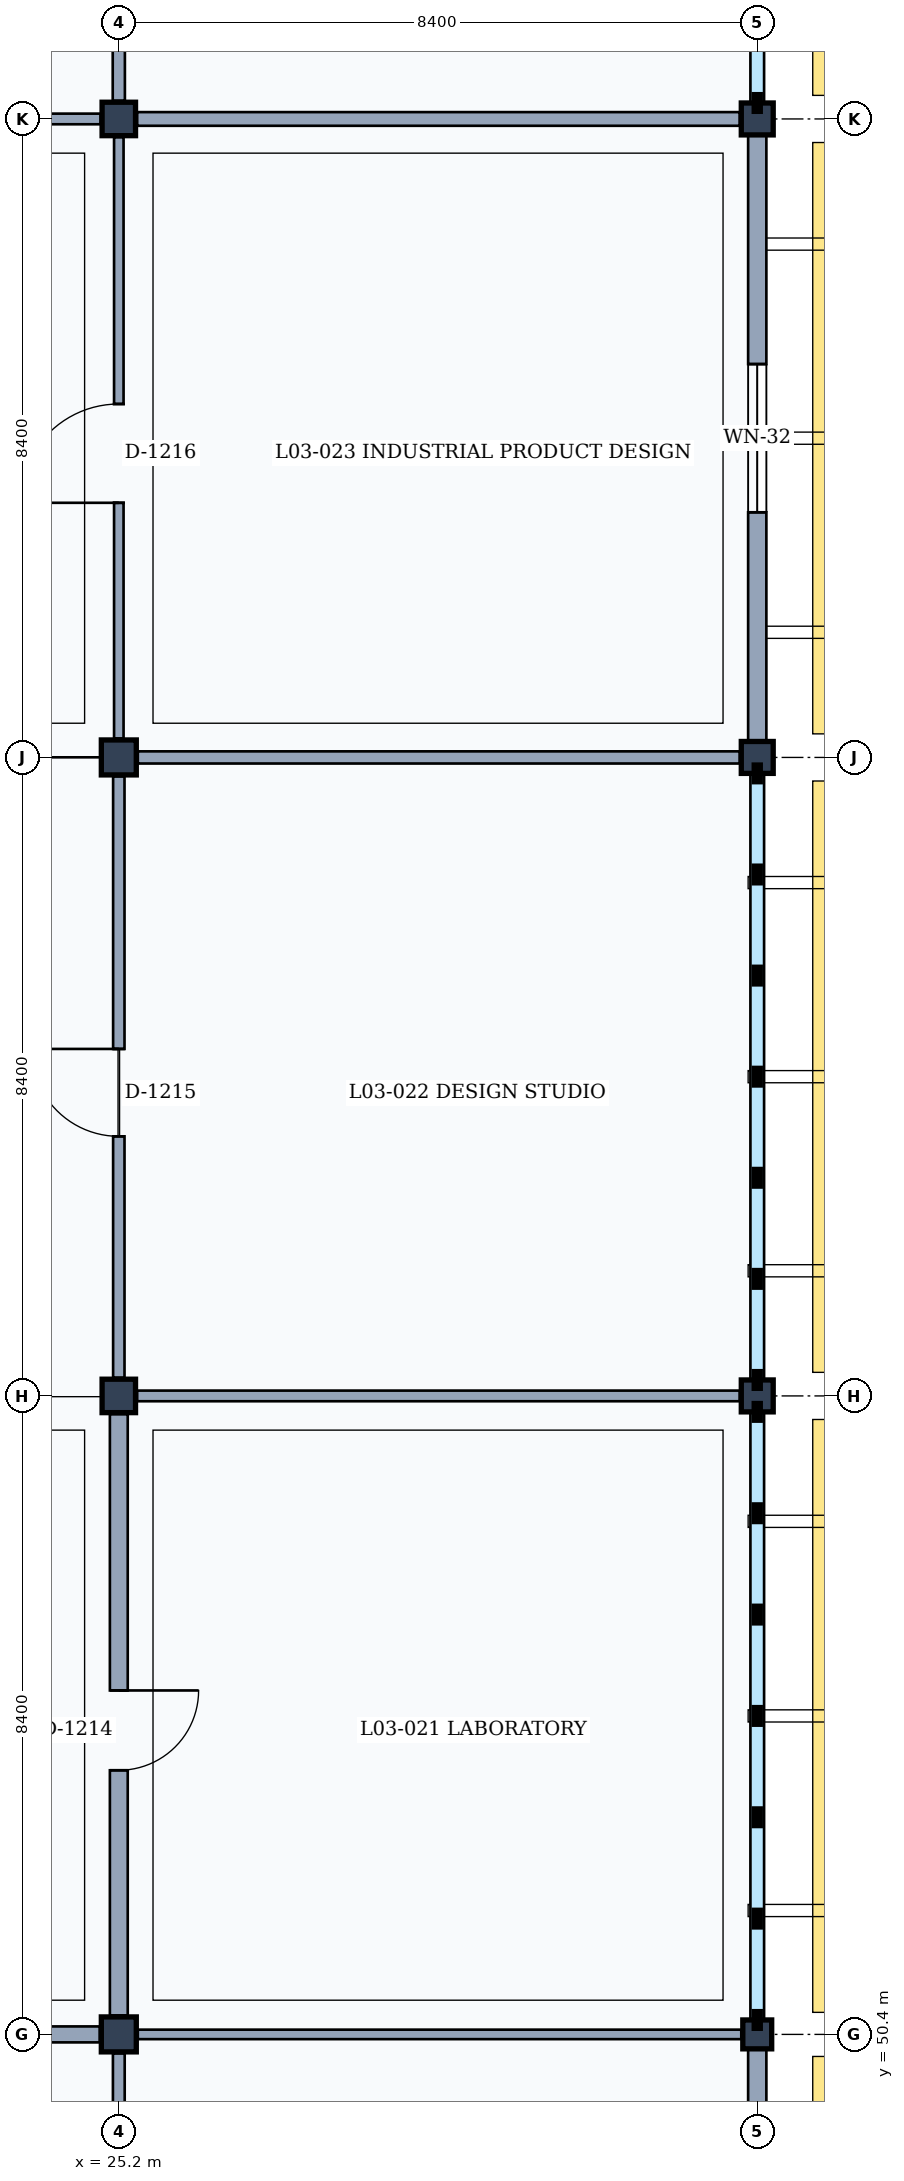
"""IFC4 building model, lengths in metres.
Left out: names, types, materials, properties, quantities, classifications, styles, units other than length and angle.
Written with IfcOpenShell. Run it as: python <this file> out.ifc"""

import sys

from ifc_helpers import new_model, si_unit, direction, frame, frame_2d, origin, origin_2d, place, context, subcontext, project, spatial, rectangle, extrude, element, fill, save


model = new_model("IFC4")
c1 = context("Model", 3, precision=1e-05, world=origin(), true_north=direction((0.0, 1.0)))
c2 = subcontext(c1, "Body", "Model", "MODEL_VIEW")
j1 = project(units=[si_unit("LENGTHUNIT", "METRE"), si_unit("PLANEANGLEUNIT", "RADIAN")], contexts=[c1])
p1 = place(None, origin())
s1 = spatial("IfcSite", under=j1, at=p1, CompositionType="ELEMENT")
p2 = place(p1, origin())
s2 = spatial("IfcBuilding", under=s1, at=p2, CompositionType="ELEMENT")
p3 = place(p2, frame((0.0, 0.0, 13.8)))
s3 = spatial("IfcBuildingStorey", under=s2, at=p3, CompositionType="ELEMENT", Elevation=13.8)
p4 = place(p3, frame((25.2, 50.4, 0.0), z_axis=(0.0, 0.0, 1.0), x_axis=(1.0, 0.0, 0.0)))
e1 = element("IfcColumn", 1, at=p4, inside=s3, PredefinedType="COLUMN", context=c2, shape_type="SweptSolid", body=[
    extrude(rectangle(XDim=0.46, YDim=0.46, at=origin_2d()), origin(), (0.0, 0.0, 1.0), 4.2),
])
p5 = place(p3, frame((25.2, 58.8, 0.0), z_axis=(0.0, 0.0, 1.0), x_axis=(1.0, 0.0, 0.0)))
e2 = element("IfcColumn", 2, at=p5, inside=s3, PredefinedType="COLUMN", context=c2, shape_type="SweptSolid", body=[
    extrude(rectangle(XDim=0.44, YDim=0.44, at=origin_2d()), origin(), (0.0, 0.0, 1.0), 4.2),
])
p6 = place(p3, frame((25.2, 67.2, 0.0), z_axis=(0.0, 0.0, 1.0), x_axis=(1.0, 0.0, 0.0)))
e3 = element("IfcColumn", 3, at=p6, inside=s3, PredefinedType="COLUMN", context=c2, shape_type="SweptSolid", body=[
    extrude(rectangle(XDim=0.46, YDim=0.46, at=origin_2d()), origin(), (0.0, 0.0, 1.0), 4.2),
])
p7 = place(p3, frame((25.2, 75.6, 0.0), z_axis=(0.0, 0.0, 1.0), x_axis=(1.0, 0.0, 0.0)))
e4 = element("IfcColumn", 4, at=p7, inside=s3, PredefinedType="COLUMN", context=c2, shape_type="SweptSolid", body=[
    extrude(rectangle(XDim=0.44, YDim=0.44, at=origin_2d()), origin(), (0.0, 0.0, 1.0), 4.2),
])
p8 = place(p3, frame((33.6, 50.4, 0.0), z_axis=(0.0, 0.0, 1.0), x_axis=(1.0, 0.0, 0.0)))
e5 = element("IfcColumn", 5, at=p8, inside=s3, PredefinedType="COLUMN", context=c2, shape_type="SweptSolid", body=[
    extrude(rectangle(XDim=0.38, YDim=0.38, at=origin_2d()), origin(), (0.0, 0.0, 1.0), 4.2),
])
for number, where, z_axis, x_axis in (
    (6, (33.6, 58.8, 0.0), (0.0, 0.0, 1.0), (1.0, 0.0, 0.0)),
    (7, (33.6, 67.2, 0.0), (0.0, 0.0, 1.0), (1.0, 0.0, 0.0)),
    (8, (33.6, 75.6, 0.0), (0.0, 0.0, 1.0), (1.0, 0.0, 0.0)),
):
    element("IfcColumn", number, at=place(p3, frame(where, z_axis=z_axis, x_axis=x_axis)), inside=s3, PredefinedType="COLUMN", context=c2, shape_type="SweptSolid", body=[
        extrude(rectangle(XDim=0.42, YDim=0.42, at=origin_2d()), origin(), (0.0, 0.0, 1.0), 4.2),
    ])
p9 = place(p3, frame((33.6, 50.21, 0.0), z_axis=(0.0, 0.0, 1.0), x_axis=(0.0, -1.0, 0.0)))
e9 = element("IfcWall", 9, at=p9, inside=s3, PredefinedType="SOLIDWALL", context=c2, shape_type="SweptSolid", body=[
    extrude(rectangle(XDim=8.04, YDim=0.24, at=frame_2d((4.02, 0.0))), origin(), (0.0, 0.0, 1.0), 3.36),
])
p10 = place(p9, frame((3.195, 0.0, 0.9)))
e10 = element("IfcOpeningElement", 10, at=p10, cuts=e9, PredefinedType="OPENING", context=c2, shape_type="SweptSolid", body=[
    extrude(rectangle(XDim=1.65, YDim=1.9, at=frame_2d((0.825, 0.95))), frame((0.0, 0.13, 0.0), z_axis=(0.0, -1.0, 0.0), x_axis=(1.0, 0.0, 0.0)), (0.0, 0.0, 1.0), 0.26),
])
p11 = place(p3, frame((33.6, 75.39, 0.0), z_axis=(0.0, 0.0, 1.0), x_axis=(0.0, -1.0, 0.0)))
e11 = element("IfcWall", 11, at=p11, inside=s3, PredefinedType="SOLIDWALL", context=c2, shape_type="SweptSolid", body=[
    extrude(rectangle(XDim=7.98, YDim=0.24, at=frame_2d((3.99, 0.0))), origin(), (0.0, 0.0, 1.0), 3.36),
])
p12 = place(p11, frame((3.015, 0.0, 0.9)))
e12 = element("IfcOpeningElement", 12, at=p12, cuts=e11, PredefinedType="OPENING", context=c2, shape_type="SweptSolid", body=[
    extrude(rectangle(XDim=1.95, YDim=1.7, at=frame_2d((0.975, 0.85))), frame((0.0, 0.13, 0.0), z_axis=(0.0, -1.0, 0.0), x_axis=(1.0, 0.0, 0.0)), (0.0, 0.0, 1.0), 0.26),
])
p13 = place(p3, frame((25.2, 42.19, 0.0), z_axis=(0.0, 0.0, 1.0), x_axis=(0.0, 1.0, 0.0)))
e13 = element("IfcWall", 13, at=p13, inside=s3, PredefinedType="PARTITIONING", context=c2, shape_type="SweptSolid", body=[
    extrude(rectangle(XDim=7.96, YDim=0.155, at=frame_2d((3.98, 0.0))), origin(), (0.0, 0.0, 1.0), 3.32),
])
p14 = place(p13, frame((2.925, 0.0, 0.0)))
e14 = element("IfcOpeningElement", 14, at=p14, cuts=e13, PredefinedType="OPENING", context=c2, shape_type="SweptSolid", body=[
    extrude(rectangle(XDim=1.65, YDim=2.25, at=frame_2d((0.825, 1.125))), frame((0.0, 0.087, 0.0), z_axis=(0.0, -1.0, 0.0), x_axis=(1.0, 0.0, 0.0)), (0.0, 0.0, 1.0), 0.175),
])
p15 = place(p3, frame((17.05, 50.4, 0.0), z_axis=(0.0, 0.0, 1.0), x_axis=(1.0, 0.0, 0.0)))
e15 = element("IfcWall", 15, at=p15, inside=s3, PredefinedType="PARTITIONING", context=c2, shape_type="SweptSolid", body=[
    extrude(rectangle(XDim=7.9, YDim=0.21, at=frame_2d((3.95, 0.0))), origin(), (0.0, 0.0, 1.0), 3.32),
])
p16 = place(p3, frame((25.2, 50.65, 0.0), z_axis=(0.0, 0.0, 1.0), x_axis=(0.0, 1.0, 0.0)))
e16 = element("IfcWall", 16, at=p16, inside=s3, PredefinedType="PARTITIONING", context=c2, shape_type="SweptSolid", body=[
    extrude(rectangle(XDim=7.91, YDim=0.235, at=frame_2d((3.955, 0.0))), origin(), (0.0, 0.0, 1.0), 3.32),
])
p17 = place(p16, frame((3.225, 0.0, 0.0)))
e17 = element("IfcOpeningElement", 17, at=p17, cuts=e16, PredefinedType="OPENING", context=c2, shape_type="SweptSolid", body=[
    extrude(rectangle(XDim=1.05, YDim=2.2, at=frame_2d((0.525, 1.1))), frame((0.0, 0.127, 0.0), z_axis=(0.0, -1.0, 0.0), x_axis=(1.0, 0.0, 0.0)), (0.0, 0.0, 1.0), 0.255),
])
p18 = place(p3, frame((25.2, 59.04, 0.0), z_axis=(0.0, 0.0, 1.0), x_axis=(0.0, 1.0, 0.0)))
e18 = element("IfcWall", 18, at=p18, inside=s3, PredefinedType="PARTITIONING", context=c2, shape_type="SweptSolid", body=[
    extrude(rectangle(XDim=7.91, YDim=0.15, at=frame_2d((3.955, 0.0))), origin(), (0.0, 0.0, 1.0), 3.32),
])
p19 = place(p18, frame((3.175, 0.0, 0.0)))
e19 = element("IfcOpeningElement", 19, at=p19, cuts=e18, PredefinedType="OPENING", context=c2, shape_type="SweptSolid", body=[
    extrude(rectangle(XDim=1.15, YDim=2.25, at=frame_2d((0.575, 1.125))), frame((0.0, 0.085, 0.0), z_axis=(0.0, -1.0, 0.0), x_axis=(1.0, 0.0, 0.0)), (0.0, 0.0, 1.0), 0.17),
])
p20 = place(p3, frame((25.2, 67.45, 0.0), z_axis=(0.0, 0.0, 1.0), x_axis=(0.0, 1.0, 0.0)))
e20 = element("IfcWall", 20, at=p20, inside=s3, PredefinedType="PARTITIONING", context=c2, shape_type="SweptSolid", body=[
    extrude(rectangle(XDim=7.91, YDim=0.125, at=frame_2d((3.955, 0.0))), origin(), (0.0, 0.0, 1.0), 3.32),
])
p21 = place(p20, frame((3.1, 0.0, 0.0)))
e21 = element("IfcOpeningElement", 21, at=p21, cuts=e20, PredefinedType="OPENING", context=c2, shape_type="SweptSolid", body=[
    extrude(rectangle(XDim=1.3, YDim=2.2, at=frame_2d((0.65, 1.1))), frame((0.0, 0.073, 0.0), z_axis=(0.0, -1.0, 0.0), x_axis=(1.0, 0.0, 0.0)), (0.0, 0.0, 1.0), 0.145),
])
p22 = place(p3, frame((17.04, 75.6, 0.0), z_axis=(0.0, 0.0, 1.0), x_axis=(1.0, 0.0, 0.0)))
e22 = element("IfcWall", 22, at=p22, inside=s3, PredefinedType="PARTITIONING", context=c2, shape_type="SweptSolid", body=[
    extrude(rectangle(XDim=7.92, YDim=0.14, at=frame_2d((3.96, 0.0))), origin(), (0.0, 0.0, 1.0), 3.32),
])
p23 = place(p3, frame((25.2, 75.84, 0.0), z_axis=(0.0, 0.0, 1.0), x_axis=(0.0, 1.0, 0.0)))
e23 = element("IfcWall", 23, at=p23, inside=s3, PredefinedType="PARTITIONING", context=c2, shape_type="SweptSolid", body=[
    extrude(rectangle(XDim=7.91, YDim=0.16, at=frame_2d((3.955, 0.0))), origin(), (0.0, 0.0, 1.0), 3.32),
])
p24 = place(p3, frame((25.45, 50.4, 0.0), z_axis=(0.0, 0.0, 1.0), x_axis=(1.0, 0.0, 0.0)))
e24 = element("IfcWall", 24, at=p24, inside=s3, PredefinedType="PARTITIONING", context=c2, shape_type="SweptSolid", body=[
    extrude(rectangle(XDim=7.94, YDim=0.125, at=frame_2d((3.97, 0.0))), origin(), (0.0, 0.0, 1.0), 3.32),
])
p25 = place(p3, frame((25.44, 58.8, 0.0), z_axis=(0.0, 0.0, 1.0), x_axis=(1.0, 0.0, 0.0)))
e25 = element("IfcWall", 25, at=p25, inside=s3, PredefinedType="PARTITIONING", context=c2, shape_type="SweptSolid", body=[
    extrude(rectangle(XDim=7.93, YDim=0.14, at=frame_2d((3.965, 0.0))), origin(), (0.0, 0.0, 1.0), 3.32),
])
p26 = place(p3, frame((25.45, 67.2, 0.0), z_axis=(0.0, 0.0, 1.0), x_axis=(1.0, 0.0, 0.0)))
e26 = element("IfcWall", 26, at=p26, inside=s3, PredefinedType="PARTITIONING", context=c2, shape_type="SweptSolid", body=[
    extrude(rectangle(XDim=7.92, YDim=0.16, at=frame_2d((3.96, 0.0))), origin(), (0.0, 0.0, 1.0), 3.32),
])
p27 = place(p3, frame((25.44, 75.6, 0.0), z_axis=(0.0, 0.0, 1.0), x_axis=(1.0, 0.0, 0.0)))
e27 = element("IfcWall", 27, at=p27, inside=s3, PredefinedType="PARTITIONING", context=c2, shape_type="SweptSolid", body=[
    extrude(rectangle(XDim=7.93, YDim=0.18, at=frame_2d((3.965, 0.0))), origin(), (0.0, 0.0, 1.0), 3.32),
])
p28 = place(p12, origin())
e28 = element("IfcWindow", 28, at=p28, inside=s3, PartitioningType="SINGLE_PANEL", PredefinedType="WINDOW", context=c2, shape_type="SweptSolid", body=[
    extrude(rectangle(XDim=1.95, YDim=1.7, at=frame_2d((0.975, 0.85))), frame((0.0, 0.03, 0.0), z_axis=(0.0, -1.0, 0.0), x_axis=(1.0, 0.0, 0.0)), (0.0, 0.0, 1.0), 0.06),
])
fill(e12, e28)
p29 = place(p17, frame((1.05, 0.0, 0.0), z_axis=(0.0, 0.0, 1.0), x_axis=(-1.0, 0.0, 0.0)))
e29 = element("IfcDoor", 29, at=p29, inside=s3, OperationType="SINGLE_SWING_LEFT", PredefinedType="DOOR", context=c2, shape_type="SweptSolid", body=[
    extrude(rectangle(XDim=1.05, YDim=2.2, at=frame_2d((0.525, 1.1))), frame((0.0, 0.025, 0.0), z_axis=(0.0, -1.0, 0.0), x_axis=(1.0, 0.0, 0.0)), (0.0, 0.0, 1.0), 0.05),
])
fill(e17, e29)
p30 = place(p19, origin())
e30 = element("IfcDoor", 30, at=p30, inside=s3, OperationType="SINGLE_SWING_RIGHT", PredefinedType="DOOR", context=c2, shape_type="SweptSolid", body=[
    extrude(rectangle(XDim=1.15, YDim=2.25, at=frame_2d((0.575, 1.125))), frame((0.0, 0.025, 0.0), z_axis=(0.0, -1.0, 0.0), x_axis=(1.0, 0.0, 0.0)), (0.0, 0.0, 1.0), 0.05),
])
fill(e19, e30)
p31 = place(p21, origin())
e31 = element("IfcDoor", 31, at=p31, inside=s3, OperationType="SINGLE_SWING_LEFT", PredefinedType="DOOR", context=c2, shape_type="SweptSolid", body=[
    extrude(rectangle(XDim=1.3, YDim=2.2, at=frame_2d((0.65, 1.1))), frame((0.0, 0.025, 0.0), z_axis=(0.0, -1.0, 0.0), x_axis=(1.0, 0.0, 0.0)), (0.0, 0.0, 1.0), 0.05),
])
fill(e21, e31)
save(model, sys.argv[1])
